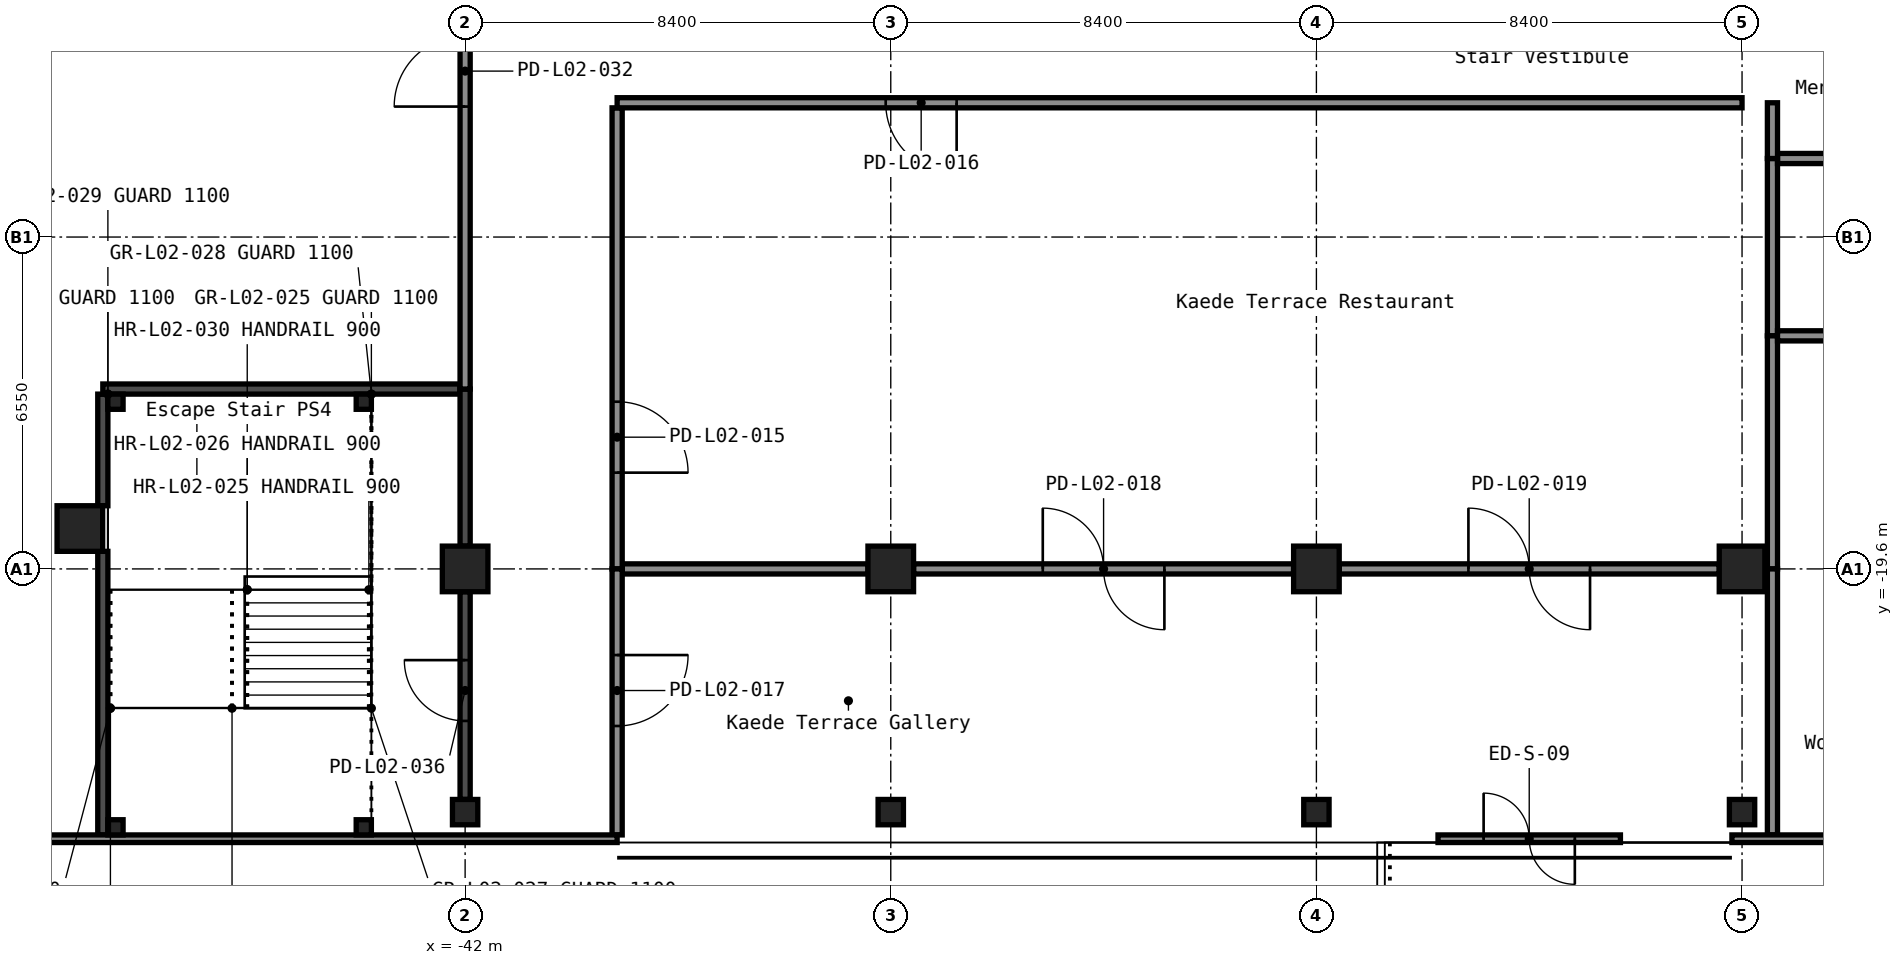
"""IFC4 building model, lengths in metres.
Left out: names, types, materials, properties, quantities, classifications, styles, units other than length and angle.
Written with IfcOpenShell. Run it as: python <this file> out.ifc"""

import sys

from ifc_helpers import new_model, si_unit, direction, frame, frame_2d, origin, origin_2d, place, context, subcontext, project, spatial, rectangle, hollow_rectangle, extrude, element, fill, save


model = new_model("IFC4")
c1 = context("Model", 3, precision=1e-05, world=origin(), true_north=direction((0.0, 1.0)))
c2 = subcontext(c1, "Body", "Model", "MODEL_VIEW")
j1 = project(units=[si_unit("LENGTHUNIT", "METRE"), si_unit("PLANEANGLEUNIT", "RADIAN")], contexts=[c1])
p1 = place(None, origin())
s1 = spatial("IfcSite", under=j1, at=p1, CompositionType="ELEMENT")
p2 = place(p1, origin())
s2 = spatial("IfcBuilding", under=s1, at=p2, CompositionType="ELEMENT")
p3 = place(p2, frame((0.0, 0.0, 9.0)))
s3 = spatial("IfcBuildingStorey", under=s2, at=p3, CompositionType="ELEMENT", Elevation=9.0)
for number, where, z_axis, x_axis in (
    (1, (-49.603, -18.803, 0.0), (0.0, 0.0, 1.0), (1.0, 0.0, 0.0)),
    (2, (-42.0, -19.6, 0.0), (0.0, 0.0, 1.0), (1.0, 0.0, 0.0)),
    (3, (-33.6, -19.6, 0.0), (0.0, 0.0, 1.0), (1.0, 0.0, 0.0)),
    (4, (-25.2, -19.6, 0.0), (0.0, 0.0, 1.0), (1.0, 0.0, 0.0)),
    (5, (-16.8, -19.6, 0.0), (0.0, 0.0, 1.0), (1.0, 0.0, 0.0)),
):
    element("IfcColumn", number, at=place(p3, frame(where, z_axis=z_axis, x_axis=x_axis)), inside=s3, PredefinedType="COLUMN", context=c2, shape_type="SweptSolid", body=[
        extrude(hollow_rectangle(XDim=0.9, YDim=0.9, WallThickness=0.036, at=origin_2d()), origin(), (0.0, 0.0, 1.0), 5.6),
    ])
for number, where, z_axis, x_axis in (
    (6, (-42.0, -24.4, 0.0), (0.0, 0.0, 1.0), (1.0, 0.0, 0.0)),
    (7, (-33.6, -24.4, 0.0), (0.0, 0.0, 1.0), (1.0, 0.0, 0.0)),
    (8, (-25.2, -24.4, 0.0), (0.0, 0.0, 1.0), (1.0, 0.0, 0.0)),
    (9, (-16.8, -24.4, 0.0), (0.0, 0.0, 1.0), (1.0, 0.0, 0.0)),
):
    element("IfcColumn", number, at=place(p3, frame(where, z_axis=z_axis, x_axis=x_axis)), inside=s3, PredefinedType="COLUMN", context=c2, shape_type="SweptSolid", body=[
        extrude(hollow_rectangle(XDim=0.5, YDim=0.5, WallThickness=0.019, InnerFilletRadius=0.029, OuterFilletRadius=0.048, at=origin_2d()), origin(), (0.0, 0.0, 1.0), 5.6),
    ])
p4 = place(p3, frame((-23.925, -67.0, -0.06), z_axis=(0.0, 0.0, 1.0), x_axis=(0.0, 1.0, 0.0)))
e10 = element("IfcWall", 10, at=p4, inside=s3, PredefinedType="STANDARD", context=c2, shape_type="SweptSolid", body=[
    extrude(rectangle(XDim=42.0, YDim=0.15, at=frame_2d((21.0, 0.0))), origin(), (0.0, 0.0, 1.0), 0.41),
])
for number, where, z_axis, x_axis in (
    (11, (-44.0, -16.3, -0.3), (0.0, 0.0, 1.0), (1.0, 0.0, 0.0)),
    (12, (-48.9, -16.3, -0.3), (0.0, 0.0, 1.0), (1.0, 0.0, 0.0)),
):
    element("IfcColumn", number, at=place(p3, frame(where, z_axis=z_axis, x_axis=x_axis)), inside=s3, PredefinedType="COLUMN", context=c2, shape_type="SweptSolid", body=[
        extrude(rectangle(XDim=0.3, YDim=0.3, at=origin_2d()), origin(), (0.0, 0.0, 1.0), 1.55),
    ])
p5 = place(p3, frame((-49.15, -24.85, 0.0), z_axis=(0.0, 0.0, 1.0), x_axis=(0.0, 1.0, 0.0)))
e13 = element("IfcWall", 13, at=p5, inside=s3, PredefinedType="SHEAR", context=c2, shape_type="SweptSolid", body=[
    extrude(rectangle(XDim=5.597, YDim=0.2, at=frame_2d((2.798, 0.0))), origin(), (0.0, 0.0, 1.0), 5.6),
])
p6 = place(p3, frame((-49.15, -18.353, 0.0), z_axis=(0.0, 0.0, 1.0), x_axis=(0.0, 1.0, 0.0)))
e14 = element("IfcWall", 14, at=p6, inside=s3, PredefinedType="SHEAR", context=c2, shape_type="SweptSolid", body=[
    extrude(rectangle(XDim=2.203, YDim=0.2, at=frame_2d((1.102, 0.0))), origin(), (0.0, 0.0, 1.0), 5.6),
])
p7 = place(p3, frame((-49.15, -16.05, 0.0), z_axis=(0.0, 0.0, 1.0), x_axis=(1.0, 0.0, 0.0)))
e15 = element("IfcWall", 15, at=p7, inside=s3, PredefinedType="SHEAR", context=c2, shape_type="SweptSolid", body=[
    extrude(rectangle(XDim=7.05, YDim=0.2, at=frame_2d((3.525, 0.0))), origin(), (0.0, 0.0, 1.0), 5.6),
])
p8 = place(p3, frame((-42.0, -16.05, 0.0), z_axis=(0.0, 0.0, 1.0), x_axis=(0.0, -1.0, 0.0)))
e16 = element("IfcWall", 16, at=p8, inside=s3, PredefinedType="SHEAR", context=c2, shape_type="SweptSolid", body=[
    extrude(rectangle(XDim=3.1, YDim=0.2, at=frame_2d((1.55, 0.0))), origin(), (0.0, 0.0, 1.0), 5.6),
])
p9 = place(p3, frame((-42.0, -20.05, 0.0), z_axis=(0.0, 0.0, 1.0), x_axis=(0.0, -1.0, 0.0)))
e17 = element("IfcWall", 17, at=p9, inside=s3, PredefinedType="SHEAR", context=c2, shape_type="SweptSolid", body=[
    extrude(rectangle(XDim=4.1, YDim=0.2, at=frame_2d((2.05, 0.0))), origin(), (0.0, 0.0, 1.0), 5.6),
])
p10 = place(p9, frame((1.35, 0.0, 0.0)))
e18 = element("IfcOpeningElement", 18, at=p10, cuts=e17, PredefinedType="OPENING", context=c2, shape_type="SweptSolid", body=[
    extrude(rectangle(XDim=1.2, YDim=2.1, at=frame_2d((0.6, 1.05))), frame((0.0, 0.11, 0.0), z_axis=(0.0, -1.0, 0.0), x_axis=(1.0, 0.0, 0.0)), (0.0, 0.0, 1.0), 0.22),
])
p11 = place(p3, frame((-17.25, -19.6, 0.0), z_axis=(0.0, 0.0, 1.0), x_axis=(-1.0, 0.0, 0.0)))
e19 = element("IfcWall", 19, at=p11, inside=s3, PredefinedType="PARTITIONING", context=c2, shape_type="SweptSolid", body=[
    extrude(rectangle(XDim=7.5, YDim=0.2, at=frame_2d((3.75, 0.0))), origin(), (0.0, 0.0, 1.0), 5.6),
])
p12 = place(p11, frame((2.55, 0.0, 0.0)))
e20 = element("IfcOpeningElement", 20, at=p12, cuts=e19, PredefinedType="OPENING", context=c2, shape_type="SweptSolid", body=[
    extrude(rectangle(XDim=2.4, YDim=2.1, at=frame_2d((1.2, 1.05))), frame((0.0, 0.11, 0.0), z_axis=(0.0, -1.0, 0.0), x_axis=(1.0, 0.0, 0.0)), (0.0, 0.0, 1.0), 0.22),
])
p13 = place(p3, frame((-25.65, -19.6, 0.0), z_axis=(0.0, 0.0, 1.0), x_axis=(-1.0, 0.0, 0.0)))
e21 = element("IfcWall", 21, at=p13, inside=s3, PredefinedType="PARTITIONING", context=c2, shape_type="SweptSolid", body=[
    extrude(rectangle(XDim=7.5, YDim=0.2, at=frame_2d((3.75, 0.0))), origin(), (0.0, 0.0, 1.0), 5.6),
])
p14 = place(p13, frame((2.55, 0.0, 0.0)))
e22 = element("IfcOpeningElement", 22, at=p14, cuts=e21, PredefinedType="OPENING", context=c2, shape_type="SweptSolid", body=[
    extrude(rectangle(XDim=2.4, YDim=2.1, at=frame_2d((1.2, 1.05))), frame((0.0, 0.11, 0.0), z_axis=(0.0, -1.0, 0.0), x_axis=(1.0, 0.0, 0.0)), (0.0, 0.0, 1.0), 0.22),
])
p15 = place(p3, frame((-34.05, -19.6, 0.0), z_axis=(0.0, 0.0, 1.0), x_axis=(-1.0, 0.0, 0.0)))
e23 = element("IfcWall", 23, at=p15, inside=s3, PredefinedType="PARTITIONING", context=c2, shape_type="SweptSolid", body=[
    extrude(rectangle(XDim=4.85, YDim=0.2, at=frame_2d((2.425, 0.0))), origin(), (0.0, 0.0, 1.0), 5.6),
])
p16 = place(p3, frame((-16.2, -15.0, 0.0), z_axis=(0.0, 0.0, 1.0), x_axis=(0.0, 1.0, 0.0)))
e24 = element("IfcWall", 24, at=p16, inside=s3, PredefinedType="PARTITIONING", context=c2, shape_type="SweptSolid", body=[
    extrude(rectangle(XDim=3.5, YDim=0.2, at=frame_2d((1.75, 0.0))), origin(), (0.0, 0.0, 1.0), 5.6),
])
p17 = place(p3, frame((-16.1, -11.5, 0.0), z_axis=(0.0, 0.0, 1.0), x_axis=(1.0, 0.0, 0.0)))
e25 = element("IfcWall", 25, at=p17, inside=s3, PredefinedType="PARTITIONING", context=c2, shape_type="SweptSolid", body=[
    extrude(rectangle(XDim=3.4, YDim=0.2, at=frame_2d((1.7, 0.0))), origin(), (0.0, 0.0, 1.0), 5.6),
])
p18 = place(p3, frame((-16.2, -11.5, 0.0), z_axis=(0.0, 0.0, 1.0), x_axis=(0.0, 1.0, 0.0)))
e26 = element("IfcWall", 26, at=p18, inside=s3, PredefinedType="PARTITIONING", context=c2, shape_type="SweptSolid", body=[
    extrude(rectangle(XDim=1.1, YDim=0.2, at=frame_2d((0.55, 0.0))), origin(), (0.0, 0.0, 1.0), 5.6),
])
p19 = place(p3, frame((-16.2, -19.6, 0.0), z_axis=(0.0, 0.0, 1.0), x_axis=(0.0, 1.0, 0.0)))
e27 = element("IfcWall", 27, at=p19, inside=s3, PredefinedType="PARTITIONING", context=c2, shape_type="SweptSolid", body=[
    extrude(rectangle(XDim=4.6, YDim=0.2, at=frame_2d((2.3, 0.0))), origin(), (0.0, 0.0, 1.0), 5.6),
])
p20 = place(p3, frame((-16.2, -24.85, 0.0), z_axis=(0.0, 0.0, 1.0), x_axis=(0.0, 1.0, 0.0)))
e28 = element("IfcWall", 28, at=p20, inside=s3, PredefinedType="PARTITIONING", context=c2, shape_type="SweptSolid", body=[
    extrude(rectangle(XDim=5.25, YDim=0.2, at=frame_2d((2.625, 0.0))), origin(), (0.0, 0.0, 1.0), 5.6),
])
p21 = place(p3, frame((-16.1, -15.0, 0.0), z_axis=(0.0, 0.0, 1.0), x_axis=(1.0, 0.0, 0.0)))
e29 = element("IfcWall", 29, at=p21, inside=s3, PredefinedType="PARTITIONING", context=c2, shape_type="SweptSolid", body=[
    extrude(rectangle(XDim=3.4, YDim=0.2, at=frame_2d((1.7, 0.0))), origin(), (0.0, 0.0, 1.0), 5.6),
])
p22 = place(p3, frame((-42.0, -16.05, 0.0), z_axis=(0.0, 0.0, 1.0), x_axis=(0.0, 1.0, 0.0)))
e30 = element("IfcWall", 30, at=p22, inside=s3, PredefinedType="PARTITIONING", context=c2, shape_type="SweptSolid", body=[
    extrude(rectangle(XDim=9.05, YDim=0.2, at=frame_2d((4.525, 0.0))), origin(), (0.0, 0.0, 1.0), 5.6),
])
p23 = place(p22, frame((5.575, 0.0, 0.0)))
e31 = element("IfcOpeningElement", 31, at=p23, cuts=e30, PredefinedType="OPENING", context=c2, shape_type="SweptSolid", body=[
    extrude(rectangle(XDim=1.4, YDim=2.1, at=frame_2d((0.7, 1.05))), frame((0.0, 0.11, 0.0), z_axis=(0.0, -1.0, 0.0), x_axis=(1.0, 0.0, 0.0)), (0.0, 0.0, 1.0), 0.22),
])
p24 = place(p3, frame((-39.0, -10.5, 0.0), z_axis=(0.0, 0.0, 1.0), x_axis=(0.0, -1.0, 0.0)))
e32 = element("IfcWall", 32, at=p24, inside=s3, PredefinedType="PARTITIONING", context=c2, shape_type="SweptSolid", body=[
    extrude(rectangle(XDim=9.1, YDim=0.2, at=frame_2d((4.55, 0.0))), origin(), (0.0, 0.0, 1.0), 5.6),
])
p25 = place(p24, frame((5.8, 0.0, 0.0)))
e33 = element("IfcOpeningElement", 33, at=p25, cuts=e32, PredefinedType="OPENING", context=c2, shape_type="SweptSolid", body=[
    extrude(rectangle(XDim=1.4, YDim=2.1, at=frame_2d((0.7, 1.05))), frame((0.0, 0.11, 0.0), z_axis=(0.0, -1.0, 0.0), x_axis=(1.0, 0.0, 0.0)), (0.0, 0.0, 1.0), 0.22),
])
p26 = place(p3, frame((-16.8, -10.4, 0.0), z_axis=(0.0, 0.0, 1.0), x_axis=(-1.0, 0.0, 0.0)))
e34 = element("IfcWall", 34, at=p26, inside=s3, PredefinedType="PARTITIONING", context=c2, shape_type="SweptSolid", body=[
    extrude(rectangle(XDim=22.2, YDim=0.2, at=frame_2d((11.1, 0.0))), origin(), (0.0, 0.0, 1.0), 5.6),
])
p27 = place(p26, frame((15.5, 0.0, 0.0)))
e35 = element("IfcOpeningElement", 35, at=p27, cuts=e34, PredefinedType="OPENING", context=c2, shape_type="SweptSolid", body=[
    extrude(rectangle(XDim=1.4, YDim=2.1, at=frame_2d((0.7, 1.05))), frame((0.0, 0.11, 0.0), z_axis=(0.0, -1.0, 0.0), x_axis=(1.0, 0.0, 0.0)), (0.0, 0.0, 1.0), 0.22),
])
p28 = place(p3, frame((-39.0, -19.6, 0.0), z_axis=(0.0, 0.0, 1.0), x_axis=(0.0, -1.0, 0.0)))
e36 = element("IfcWall", 36, at=p28, inside=s3, PredefinedType="PARTITIONING", context=c2, shape_type="SweptSolid", body=[
    extrude(rectangle(XDim=5.25, YDim=0.2, at=frame_2d((2.625, 0.0))), origin(), (0.0, 0.0, 1.0), 5.6),
])
p29 = place(p28, frame((1.7, 0.0, 0.0)))
e37 = element("IfcOpeningElement", 37, at=p29, cuts=e36, PredefinedType="OPENING", context=c2, shape_type="SweptSolid", body=[
    extrude(rectangle(XDim=1.4, YDim=2.1, at=frame_2d((0.7, 1.05))), frame((0.0, 0.11, 0.0), z_axis=(0.0, -1.0, 0.0), x_axis=(1.0, 0.0, 0.0)), (0.0, 0.0, 1.0), 0.22),
])
p30 = place(p3, frame((-8.4, -24.925, 0.0), z_axis=(0.0, 0.0, 1.0), x_axis=(-1.0, 0.0, 0.0)))
e38 = element("IfcWall", 38, at=p30, inside=s3, PredefinedType="STANDARD", context=c2, shape_type="SweptSolid", body=[
    extrude(rectangle(XDim=8.6, YDim=0.15, at=frame_2d((4.3, 0.0))), origin(), (0.0, 0.0, 1.0), 5.6),
])
p31 = place(p3, frame((-19.2, -24.925, 0.0), z_axis=(0.0, 0.0, 1.0), x_axis=(-1.0, 0.0, 0.0)))
e39 = element("IfcWall", 39, at=p31, inside=s3, PredefinedType="STANDARD", context=c2, shape_type="SweptSolid", body=[
    extrude(rectangle(XDim=3.6, YDim=0.15, at=frame_2d((1.8, 0.0))), origin(), (0.0, 0.0, 1.0), 5.6),
])
p32 = place(p31, frame((0.9, 0.0, 0.0)))
e40 = element("IfcOpeningElement", 40, at=p32, cuts=e39, PredefinedType="OPENING", context=c2, shape_type="SweptSolid", body=[
    extrude(rectangle(XDim=1.8, YDim=2.1, at=frame_2d((0.9, 1.05))), frame((0.0, 0.085, 0.0), z_axis=(0.0, -1.0, 0.0), x_axis=(1.0, 0.0, 0.0)), (0.0, 0.0, 1.0), 0.17),
])
p33 = place(p3, frame((-39.0, -24.925, 0.0), z_axis=(0.0, 0.0, 1.0), x_axis=(-1.0, 0.0, 0.0)))
e41 = element("IfcWall", 41, at=p33, inside=s3, PredefinedType="STANDARD", context=c2, shape_type="SweptSolid", body=[
    extrude(rectangle(XDim=12.98, YDim=0.15, at=frame_2d((6.49, 0.0))), origin(), (0.0, 0.0, 1.0), 5.6),
])
for number, where, z_axis, x_axis in (
    (42, (-44.0, -24.7, 0.0), (0.0, 0.0, 1.0), (1.0, 0.0, 0.0)),
    (43, (-48.9, -24.7, 0.0), (0.0, 0.0, 1.0), (1.0, 0.0, 0.0)),
    (44, (-44.0, -16.3, 1.5), (0.0, 0.0, 1.0), (1.0, 0.0, 0.0)),
    (45, (-48.9, -16.3, 1.5), (0.0, 0.0, 1.0), (1.0, 0.0, 0.0)),
):
    element("IfcColumn", number, at=place(p3, frame(where, z_axis=z_axis, x_axis=x_axis)), inside=s3, PredefinedType="COLUMN", context=c2, shape_type="SweptSolid", body=[
        extrude(rectangle(XDim=0.3, YDim=0.3, at=origin_2d()), origin(), (0.0, 0.0, 1.0), 2.75),
    ])
p34 = place(p25, origin())
e46 = element("IfcDoor", 46, at=p34, inside=s3, OperationType="SINGLE_SWING_LEFT", PredefinedType="DOOR", context=c2, shape_type="SweptSolid", body=[
    extrude(rectangle(XDim=1.4, YDim=2.1, at=frame_2d((0.7, 1.05))), frame((0.0, 0.025, 0.0), z_axis=(0.0, -1.0, 0.0), x_axis=(1.0, 0.0, 0.0)), (0.0, 0.0, 1.0), 0.05),
])
fill(e33, e46)
p35 = place(p27, origin())
e47 = element("IfcDoor", 47, at=p35, inside=s3, OperationType="SINGLE_SWING_RIGHT", PredefinedType="DOOR", context=c2, shape_type="SweptSolid", body=[
    extrude(rectangle(XDim=1.4, YDim=2.1, at=frame_2d((0.7, 1.05))), frame((0.0, 0.025, 0.0), z_axis=(0.0, -1.0, 0.0), x_axis=(1.0, 0.0, 0.0)), (0.0, 0.0, 1.0), 0.05),
])
fill(e35, e47)
p36 = place(p29, origin())
e48 = element("IfcDoor", 48, at=p36, inside=s3, OperationType="SINGLE_SWING_RIGHT", PredefinedType="DOOR", context=c2, shape_type="SweptSolid", body=[
    extrude(rectangle(XDim=1.4, YDim=2.1, at=frame_2d((0.7, 1.05))), frame((0.0, 0.025, 0.0), z_axis=(0.0, -1.0, 0.0), x_axis=(1.0, 0.0, 0.0)), (0.0, 0.0, 1.0), 0.05),
])
fill(e37, e48)
p37 = place(p14, origin())
e49 = element("IfcDoor", 49, at=p37, inside=s3, OperationType="DOUBLE_DOOR_DOUBLE_SWING", PredefinedType="DOOR", context=c2, shape_type="SweptSolid", body=[
    extrude(rectangle(XDim=2.4, YDim=2.1, at=frame_2d((1.2, 1.05))), frame((0.0, 0.025, 0.0), z_axis=(0.0, -1.0, 0.0), x_axis=(1.0, 0.0, 0.0)), (0.0, 0.0, 1.0), 0.05),
])
fill(e22, e49)
p38 = place(p12, origin())
e50 = element("IfcDoor", 50, at=p38, inside=s3, OperationType="DOUBLE_DOOR_DOUBLE_SWING", PredefinedType="DOOR", context=c2, shape_type="SweptSolid", body=[
    extrude(rectangle(XDim=2.4, YDim=2.1, at=frame_2d((1.2, 1.05))), frame((0.0, 0.025, 0.0), z_axis=(0.0, -1.0, 0.0), x_axis=(1.0, 0.0, 0.0)), (0.0, 0.0, 1.0), 0.05),
])
fill(e20, e50)
p39 = place(p23, origin())
e51 = element("IfcDoor", 51, at=p39, inside=s3, OperationType="SINGLE_SWING_RIGHT", PredefinedType="DOOR", context=c2, shape_type="SweptSolid", body=[
    extrude(rectangle(XDim=1.4, YDim=2.1, at=frame_2d((0.7, 1.05))), frame((0.0, 0.025, 0.0), z_axis=(0.0, -1.0, 0.0), x_axis=(1.0, 0.0, 0.0)), (0.0, 0.0, 1.0), 0.05),
])
fill(e31, e51)
p40 = place(p10, origin())
e52 = element("IfcDoor", 52, at=p40, inside=s3, OperationType="SINGLE_SWING_LEFT", PredefinedType="DOOR", context=c2, shape_type="SweptSolid", body=[
    extrude(rectangle(XDim=1.2, YDim=2.1, at=frame_2d((0.6, 1.05))), frame((0.0, 0.025, 0.0), z_axis=(0.0, -1.0, 0.0), x_axis=(1.0, 0.0, 0.0)), (0.0, 0.0, 1.0), 0.05),
])
fill(e18, e52)
p41 = place(p32, origin())
e53 = element("IfcDoor", 53, at=p41, inside=s3, OperationType="DOUBLE_DOOR_DOUBLE_SWING", PredefinedType="DOOR", context=c2, shape_type="SweptSolid", body=[
    extrude(rectangle(XDim=1.8, YDim=2.1, at=frame_2d((0.9, 1.05))), frame((0.0, 0.025, 0.0), z_axis=(0.0, -1.0, 0.0), x_axis=(1.0, 0.0, 0.0)), (0.0, 0.0, 1.0), 0.05),
])
fill(e40, e53)
save(model, sys.argv[1])
